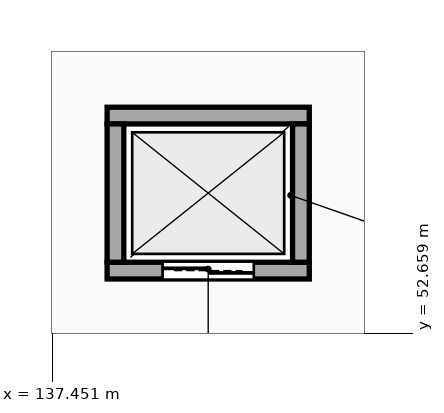
"""IFC4 building model, lengths in metres.
Left out: names, types, materials, properties, quantities, classifications, styles, units other than length and angle.
Written with IfcOpenShell. Run it as: python <this file> out.ifc"""

import sys

from ifc_helpers import new_model, si_unit, direction, frame, frame_2d, origin, place, context, subcontext, project, spatial, rectangle, extrude, element, fill, save


model = new_model("IFC4")
c1 = context("Model", 3, precision=1e-05, world=origin(), true_north=direction((0.0, 1.0)))
c2 = subcontext(c1, "Body", "Model", "MODEL_VIEW")
j1 = project(units=[si_unit("LENGTHUNIT", "METRE"), si_unit("PLANEANGLEUNIT", "RADIAN")], contexts=[c1])
p1 = place(None, origin())
s1 = spatial("IfcSite", under=j1, at=p1, CompositionType="ELEMENT")
p2 = place(p1, origin())
s2 = spatial("IfcBuilding", under=s1, at=p2, CompositionType="ELEMENT")
p3 = place(p2, frame((0.0, 0.0, 10.8)))
s3 = spatial("IfcBuildingStorey", under=s2, at=p3, CompositionType="ELEMENT", Elevation=10.8)
p4 = place(p3, frame((138.17, 53.48, 0.0), z_axis=(0.0, 0.0, 1.0), x_axis=(1.0, 0.0, 0.0)))
e1 = element("IfcWall", 1, at=p4, inside=s3, PredefinedType="STANDARD", context=c2, shape_type="SweptSolid", body=[
    extrude(rectangle(XDim=2.66, YDim=0.22, at=frame_2d((1.33, 0.0))), origin(), (0.0, 0.0, 1.0), 4.22),
])
p5 = place(p4, frame((0.73, 0.0, 0.0)))
e2 = element("IfcOpeningElement", 2, at=p5, cuts=e1, PredefinedType="OPENING", context=c2, shape_type="SweptSolid", body=[
    extrude(rectangle(XDim=1.2, YDim=2.2, at=frame_2d((0.6, 1.1))), frame((0.0, 0.12, 0.0), z_axis=(0.0, -1.0, 0.0), x_axis=(1.0, 0.0, 0.0)), (0.0, 0.0, 1.0), 0.24),
])
p6 = place(p3, frame((140.83, 55.52, 0.0), z_axis=(0.0, 0.0, 1.0), x_axis=(-1.0, 0.0, 0.0)))
e3 = element("IfcWall", 3, at=p6, inside=s3, PredefinedType="STANDARD", context=c2, shape_type="SweptSolid", body=[
    extrude(rectangle(XDim=2.66, YDim=0.22, at=frame_2d((1.33, 0.0))), origin(), (0.0, 0.0, 1.0), 4.22),
])
for number, where, z_axis, x_axis in (
    (4, (138.28, 55.41, 0.0), (0.0, 0.0, 1.0), (0.0, -1.0, 0.0)),
    (5, (140.72, 53.59, 0.0), (0.0, 0.0, 1.0), (0.0, 1.0, 0.0)),
):
    element("IfcWall", number, at=place(p3, frame(where, z_axis=z_axis, x_axis=x_axis)), inside=s3, PredefinedType="STANDARD", context=c2, shape_type="SweptSolid", body=[
        extrude(rectangle(XDim=1.82, YDim=0.22, at=frame_2d((0.91, 0.0))), origin(), (0.0, 0.0, 1.0), 4.22),
    ])
p7 = place(p5, origin())
e6 = element("IfcDoor", 6, at=p7, inside=s3, OperationType="DOUBLE_DOOR_SLIDING", PredefinedType="DOOR", context=c2, shape_type="SweptSolid", body=[
    extrude(rectangle(XDim=1.2, YDim=2.2, at=frame_2d((0.6, 1.1))), frame((0.0, 0.025, 0.0), z_axis=(0.0, -1.0, 0.0), x_axis=(1.0, 0.0, 0.0)), (0.0, 0.0, 1.0), 0.05),
])
fill(e2, e6)
save(model, sys.argv[1])
